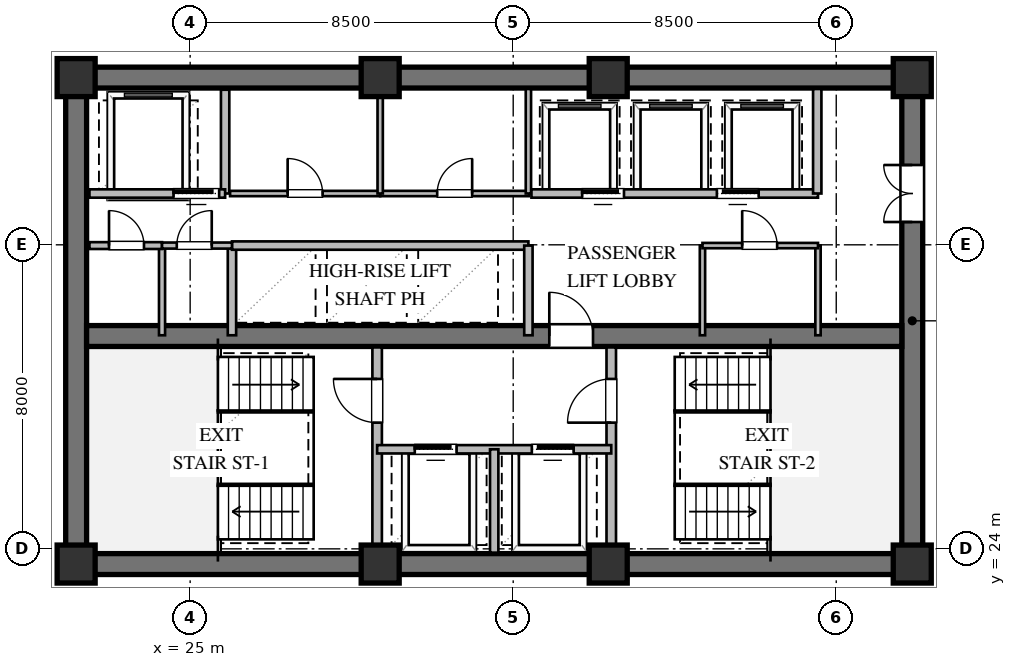
"""IFC4 building model, lengths in metres.
Left out: names, types, materials, properties, quantities, classifications, styles, units other than length and angle.
Written with IfcOpenShell. Run it as: python <this file> out.ifc"""

import sys

from ifc_helpers import new_model, si_unit, direction, frame, frame_2d, origin, origin_2d, place, context, subcontext, project, spatial, rectangle, extrude, element, fill, save


model = new_model("IFC4")
c1 = context("Model", 3, precision=1e-05, world=origin(), true_north=direction((0.0, 1.0)))
c2 = subcontext(c1, "Body", "Model", "MODEL_VIEW")
j1 = project(units=[si_unit("LENGTHUNIT", "METRE"), si_unit("PLANEANGLEUNIT", "RADIAN")], contexts=[c1])
p1 = place(None, origin())
s1 = spatial("IfcSite", under=j1, at=p1, CompositionType="ELEMENT")
p2 = place(p1, origin())
s2 = spatial("IfcBuilding", under=s1, at=p2, CompositionType="ELEMENT")
p3 = place(p2, frame((0.0, 0.0, 167.4)))
s3 = spatial("IfcBuildingStorey", under=s2, at=p3, CompositionType="ELEMENT", Elevation=167.4)
for number, where, z_axis, x_axis in (
    (1, (21.725, 23.6, 0.0), (0.0, 0.0, 1.0), (1.0, 0.0, 0.0)),
    (2, (21.725, 36.4, 0.0), (0.0, 0.0, 1.0), (1.0, 0.0, 0.0)),
):
    element("IfcWall", number, at=place(p3, frame(where, z_axis=z_axis, x_axis=x_axis)), inside=s3, PredefinedType="SHEAR", context=c2, shape_type="SweptSolid", body=[
        extrude(rectangle(XDim=22.55, YDim=0.55, at=frame_2d((11.275, 0.0))), origin(), (0.0, 0.0, 1.0), 3.36),
    ])
p4 = place(p3, frame((22.0, 23.875, 0.0), z_axis=(0.0, 0.0, 1.0), x_axis=(0.0, 1.0, 0.0)))
e3 = element("IfcWall", 3, at=p4, inside=s3, PredefinedType="SHEAR", context=c2, shape_type="SweptSolid", body=[
    extrude(rectangle(XDim=12.25, YDim=0.55, at=frame_2d((6.125, 0.0))), origin(), (0.0, 0.0, 1.0), 3.36),
])
p5 = place(p3, frame((44.0, 23.875, 0.0), z_axis=(0.0, 0.0, 1.0), x_axis=(0.0, 1.0, 0.0)))
e4 = element("IfcWall", 4, at=p5, inside=s3, PredefinedType="SHEAR", context=c2, shape_type="SweptSolid", body=[
    extrude(rectangle(XDim=12.25, YDim=0.55, at=frame_2d((6.125, 0.0))), origin(), (0.0, 0.0, 1.0), 3.36),
])
p6 = place(p5, frame((8.725, 0.0, 0.0)))
e5 = element("IfcOpeningElement", 5, at=p6, cuts=e4, PredefinedType="OPENING", context=c2, shape_type="SweptSolid", body=[
    extrude(rectangle(XDim=1.5, YDim=2.15, at=frame_2d((0.75, 1.075))), frame((0.0, 0.285, 0.0), z_axis=(0.0, -1.0, 0.0), x_axis=(1.0, 0.0, 0.0)), (0.0, 0.0, 1.0), 0.57),
])
p7 = place(p3, frame((22.275, 29.6, 0.0), z_axis=(0.0, 0.0, 1.0), x_axis=(1.0, 0.0, 0.0)))
e6 = element("IfcWall", 6, at=p7, inside=s3, PredefinedType="SHEAR", context=c2, shape_type="SweptSolid", body=[
    extrude(rectangle(XDim=21.45, YDim=0.55, at=frame_2d((10.725, 0.0))), origin(), (0.0, 0.0, 1.0), 3.36),
])
p8 = place(p7, frame((12.175, 0.0, 0.0)))
e7 = element("IfcOpeningElement", 7, at=p8, cuts=e6, PredefinedType="OPENING", context=c2, shape_type="SweptSolid", body=[
    extrude(rectangle(XDim=1.15, YDim=2.1, at=frame_2d((0.575, 1.05))), frame((0.0, 0.285, 0.0), z_axis=(0.0, -1.0, 0.0), x_axis=(1.0, 0.0, 0.0)), (0.0, 0.0, 1.0), 0.57),
])
for number, where, z_axis, x_axis in (
    (8, (22.0, 23.6, 0.0), (0.0, 0.0, 1.0), (1.0, 0.0, 0.0)),
    (9, (30.0, 23.6, 0.0), (0.0, 0.0, 1.0), (1.0, 0.0, 0.0)),
    (10, (36.0, 23.6, 0.0), (0.0, 0.0, 1.0), (1.0, 0.0, 0.0)),
    (11, (44.0, 23.6, 0.0), (0.0, 0.0, 1.0), (1.0, 0.0, 0.0)),
    (12, (44.0, 36.4, 0.0), (0.0, 0.0, 1.0), (1.0, 0.0, 0.0)),
    (13, (36.0, 36.4, 0.0), (0.0, 0.0, 1.0), (1.0, 0.0, 0.0)),
    (14, (30.0, 36.4, 0.0), (0.0, 0.0, 1.0), (1.0, 0.0, 0.0)),
    (15, (22.0, 36.4, 0.0), (0.0, 0.0, 1.0), (1.0, 0.0, 0.0)),
):
    element("IfcColumn", number, at=place(p3, frame(where, z_axis=z_axis, x_axis=x_axis)), inside=s3, PredefinedType="COLUMN", context=c2, shape_type="SweptSolid", body=[
        extrude(rectangle(XDim=1.0, YDim=1.0, at=origin_2d()), origin(), (0.0, 0.0, 1.0), 3.6),
    ])
p9 = place(p3, frame((29.92, 23.9, 0.0), z_axis=(0.0, 0.0, 1.0), x_axis=(0.0, 1.0, 0.0)))
e16 = element("IfcWall", 16, at=p9, inside=s3, PredefinedType="SOLIDWALL", context=c2, shape_type="SweptSolid", body=[
    extrude(rectangle(XDim=5.4, YDim=0.25, at=frame_2d((2.7, 0.0))), origin(), (0.0, 0.0, 1.0), 2.806),
])
p10 = place(p9, frame((3.421, 0.0, 0.0)))
e17 = element("IfcOpeningElement", 17, at=p10, cuts=e16, PredefinedType="OPENING", context=c2, shape_type="SweptSolid", body=[
    extrude(rectangle(XDim=1.15, YDim=2.1, at=frame_2d((0.575, 1.05))), frame((0.0, 0.135, 0.0), z_axis=(0.0, -1.0, 0.0), x_axis=(1.0, 0.0, 0.0)), (0.0, 0.0, 1.0), 0.27),
])
p11 = place(p3, frame((36.08, 23.9, 0.0), z_axis=(0.0, 0.0, 1.0), x_axis=(0.0, 1.0, 0.0)))
e18 = element("IfcWall", 18, at=p11, inside=s3, PredefinedType="SOLIDWALL", context=c2, shape_type="SweptSolid", body=[
    extrude(rectangle(XDim=5.4, YDim=0.25, at=frame_2d((2.7, 0.0))), origin(), (0.0, 0.0, 1.0), 3.36),
])
p12 = place(p11, frame((3.421, 0.0, 0.0)))
e19 = element("IfcOpeningElement", 19, at=p12, cuts=e18, PredefinedType="OPENING", context=c2, shape_type="SweptSolid", body=[
    extrude(rectangle(XDim=1.15, YDim=2.1, at=frame_2d((0.575, 1.05))), frame((0.0, 0.135, 0.0), z_axis=(0.0, -1.0, 0.0), x_axis=(1.0, 0.0, 0.0)), (0.0, 0.0, 1.0), 0.27),
])
p13 = place(p3, frame((29.92, 26.62, 0.0), z_axis=(0.0, 0.0, 1.0), x_axis=(1.0, 0.0, 0.0)))
e20 = element("IfcWall", 20, at=p13, inside=s3, PredefinedType="SOLIDWALL", context=c2, shape_type="SweptSolid", body=[
    extrude(rectangle(XDim=6.16, YDim=0.22, at=frame_2d((3.08, 0.0))), origin(), (0.0, 0.0, 1.0), 3.36),
])
p14 = place(p13, frame((0.99, 0.0, 0.0)))
e21 = element("IfcOpeningElement", 21, at=p14, cuts=e20, PredefinedType="OPENING", context=c2, shape_type="SweptSolid", body=[
    extrude(rectangle(XDim=1.1, YDim=2.1, at=frame_2d((0.55, 1.05))), frame((0.0, 0.12, 0.0), z_axis=(0.0, -1.0, 0.0), x_axis=(1.0, 0.0, 0.0)), (0.0, 0.0, 1.0), 0.24),
])
p15 = place(p13, frame((4.07, 0.0, 0.0)))
e22 = element("IfcOpeningElement", 22, at=p15, cuts=e20, PredefinedType="OPENING", context=c2, shape_type="SweptSolid", body=[
    extrude(rectangle(XDim=1.1, YDim=2.1, at=frame_2d((0.55, 1.05))), frame((0.0, 0.12, 0.0), z_axis=(0.0, -1.0, 0.0), x_axis=(1.0, 0.0, 0.0)), (0.0, 0.0, 1.0), 0.24),
])
p16 = place(p3, frame((33.0, 23.9, 0.0), z_axis=(0.0, 0.0, 1.0), x_axis=(0.0, 1.0, 0.0)))
e23 = element("IfcWall", 23, at=p16, inside=s3, PredefinedType="SOLIDWALL", context=c2, shape_type="SweptSolid", body=[
    extrude(rectangle(XDim=2.72, YDim=0.22, at=frame_2d((1.36, 0.0))), origin(), (0.0, 0.0, 1.0), 3.36),
])
p17 = place(p3, frame((25.92, 33.35, 0.0), z_axis=(0.0, 0.0, 1.0), x_axis=(0.0, 1.0, 0.0)))
e24 = element("IfcWall", 24, at=p17, inside=s3, PredefinedType="SOLIDWALL", context=c2, shape_type="SweptSolid", body=[
    extrude(rectangle(XDim=2.73, YDim=0.22, at=frame_2d((1.365, 0.0))), origin(), (0.0, 0.0, 1.0), 3.36),
])
p18 = place(p3, frame((22.35, 33.35, 0.0), z_axis=(0.0, 0.0, 1.0), x_axis=(1.0, 0.0, 0.0)))
e25 = element("IfcWall", 25, at=p18, inside=s3, PredefinedType="SOLIDWALL", context=c2, shape_type="SweptSolid", body=[
    extrude(rectangle(XDim=3.57, YDim=0.22, at=frame_2d((1.785, 0.0))), origin(), (0.0, 0.0, 1.0), 3.36),
])
p19 = place(p18, frame((2.213, 0.0, 0.0)))
e26 = element("IfcOpeningElement", 26, at=p19, cuts=e25, PredefinedType="OPENING", context=c2, shape_type="SweptSolid", body=[
    extrude(rectangle(XDim=1.2, YDim=2.1, at=frame_2d((0.6, 1.05))), frame((0.0, 0.12, 0.0), z_axis=(0.0, -1.0, 0.0), x_axis=(1.0, 0.0, 0.0)), (0.0, 0.0, 1.0), 0.24),
])
p20 = place(p3, frame((26.1, 29.62, 0.0), z_axis=(0.0, 0.0, 1.0), x_axis=(0.0, 1.0, 0.0)))
e27 = element("IfcWall", 27, at=p20, inside=s3, PredefinedType="SOLIDWALL", context=c2, shape_type="SweptSolid", body=[
    extrude(rectangle(XDim=2.36, YDim=0.22, at=frame_2d((1.18, 0.0))), origin(), (0.0, 0.0, 1.0), 3.36),
])
p21 = place(p3, frame((26.1, 31.98, 0.0), z_axis=(0.0, 0.0, 1.0), x_axis=(1.0, 0.0, 0.0)))
e28 = element("IfcWall", 28, at=p21, inside=s3, PredefinedType="SOLIDWALL", context=c2, shape_type="SweptSolid", body=[
    extrude(rectangle(XDim=7.8, YDim=0.22, at=frame_2d((3.9, 0.0))), origin(), (0.0, 0.0, 1.0), 3.36),
])
p22 = place(p3, frame((33.9, 29.62, 0.0), z_axis=(0.0, 0.0, 1.0), x_axis=(0.0, 1.0, 0.0)))
e29 = element("IfcWall", 29, at=p22, inside=s3, PredefinedType="SOLIDWALL", context=c2, shape_type="SweptSolid", body=[
    extrude(rectangle(XDim=2.36, YDim=0.22, at=frame_2d((1.18, 0.0))), origin(), (0.0, 0.0, 1.0), 3.36),
])
p23 = place(p3, frame((26.05, 33.35, 0.0), z_axis=(0.0, 0.0, 1.0), x_axis=(1.0, 0.0, 0.0)))
e30 = element("IfcWall", 30, at=p23, inside=s3, PredefinedType="PARTITIONING", context=c2, shape_type="SweptSolid", body=[
    extrude(rectangle(XDim=3.95, YDim=0.14, at=frame_2d((1.975, 0.0))), origin(), (0.0, 0.0, 1.0), 3.36),
])
p24 = place(p23, frame((1.515, 0.0, 0.0)))
e31 = element("IfcOpeningElement", 31, at=p24, cuts=e30, PredefinedType="OPENING", context=c2, shape_type="SweptSolid", body=[
    extrude(rectangle(XDim=0.92, YDim=2.1, at=frame_2d((0.46, 1.05))), frame((0.0, 0.08, 0.0), z_axis=(0.0, -1.0, 0.0), x_axis=(1.0, 0.0, 0.0)), (0.0, 0.0, 1.0), 0.16),
])
p25 = place(p3, frame((30.0, 33.35, 0.0), z_axis=(0.0, 0.0, 1.0), x_axis=(1.0, 0.0, 0.0)))
e32 = element("IfcWall", 32, at=p25, inside=s3, PredefinedType="PARTITIONING", context=c2, shape_type="SweptSolid", body=[
    extrude(rectangle(XDim=3.92, YDim=0.14, at=frame_2d((1.96, 0.0))), origin(), (0.0, 0.0, 1.0), 3.36),
])
p26 = place(p25, frame((1.5, 0.0, 0.0)))
e33 = element("IfcOpeningElement", 33, at=p26, cuts=e32, PredefinedType="OPENING", context=c2, shape_type="SweptSolid", body=[
    extrude(rectangle(XDim=0.92, YDim=2.1, at=frame_2d((0.46, 1.05))), frame((0.0, 0.08, 0.0), z_axis=(0.0, -1.0, 0.0), x_axis=(1.0, 0.0, 0.0)), (0.0, 0.0, 1.0), 0.16),
])
for number, where, z_axis, x_axis in (
    (34, (30.0, 33.35, 0.0), (0.0, 0.0, 1.0), (0.0, 1.0, 0.0)),
    (35, (33.9, 33.35, 0.0), (0.0, 0.0, 1.0), (0.0, 1.0, 0.0)),
):
    element("IfcWall", number, at=place(p3, frame(where, z_axis=z_axis, x_axis=x_axis)), inside=s3, PredefinedType="PARTITIONING", context=c2, shape_type="SweptSolid", body=[
        extrude(rectangle(XDim=2.75, YDim=0.14, at=frame_2d((1.375, 0.0))), origin(), (0.0, 0.0, 1.0), 3.36),
    ])
p27 = place(p3, frame((33.98, 33.35, 0.0), z_axis=(0.0, 0.0, 1.0), x_axis=(1.0, 0.0, 0.0)))
e36 = element("IfcWall", 36, at=p27, inside=s3, PredefinedType="SOLIDWALL", context=c2, shape_type="SweptSolid", body=[
    extrude(rectangle(XDim=7.54, YDim=0.22, at=frame_2d((3.77, 0.0))), origin(), (0.0, 0.0, 1.0), 3.36),
])
p28 = place(p27, frame((1.335, 0.0, 0.0)))
e37 = element("IfcOpeningElement", 37, at=p28, cuts=e36, PredefinedType="OPENING", context=c2, shape_type="SweptSolid", body=[
    extrude(rectangle(XDim=1.1, YDim=2.1, at=frame_2d((0.55, 1.05))), frame((0.0, 0.12, 0.0), z_axis=(0.0, -1.0, 0.0), x_axis=(1.0, 0.0, 0.0)), (0.0, 0.0, 1.0), 0.24),
])
p29 = place(p27, frame((4.879, 0.0, 0.0)))
e38 = element("IfcOpeningElement", 38, at=p29, cuts=e36, PredefinedType="OPENING", context=c2, shape_type="SweptSolid", body=[
    extrude(rectangle(XDim=1.1, YDim=2.1, at=frame_2d((0.55, 1.05))), frame((0.0, 0.12, 0.0), z_axis=(0.0, -1.0, 0.0), x_axis=(1.0, 0.0, 0.0)), (0.0, 0.0, 1.0), 0.24),
])
p30 = place(p3, frame((41.5, 33.35, 0.0), z_axis=(0.0, 0.0, 1.0), x_axis=(0.0, 1.0, 0.0)))
e39 = element("IfcWall", 39, at=p30, inside=s3, PredefinedType="SOLIDWALL", context=c2, shape_type="SweptSolid", body=[
    extrude(rectangle(XDim=2.75, YDim=0.22, at=frame_2d((1.375, 0.0))), origin(), (0.0, 0.0, 1.0), 3.36),
])
p31 = place(p3, frame((24.26, 29.62, 0.0), z_axis=(0.0, 0.0, 1.0), x_axis=(0.0, 1.0, 0.0)))
e40 = element("IfcWall", 40, at=p31, inside=s3, PredefinedType="PLUMBINGWALL", context=c2, shape_type="SweptSolid", body=[
    extrude(rectangle(XDim=2.36, YDim=0.16, at=frame_2d((1.18, 0.0))), origin(), (0.0, 0.0, 1.0), 3.36),
])
p32 = place(p3, frame((22.35, 31.98, 0.0), z_axis=(0.0, 0.0, 1.0), x_axis=(1.0, 0.0, 0.0)))
e41 = element("IfcWall", 41, at=p32, inside=s3, PredefinedType="PARTITIONING", context=c2, shape_type="SweptSolid", body=[
    extrude(rectangle(XDim=1.91, YDim=0.18, at=frame_2d((0.955, 0.0))), origin(), (0.0, 0.0, 1.0), 3.36),
])
p33 = place(p32, frame((0.515, 0.0, 0.0)))
e42 = element("IfcOpeningElement", 42, at=p33, cuts=e41, PredefinedType="OPENING", context=c2, shape_type="SweptSolid", body=[
    extrude(rectangle(XDim=0.92, YDim=2.1, at=frame_2d((0.46, 1.05))), frame((0.0, 0.1, 0.0), z_axis=(0.0, -1.0, 0.0), x_axis=(1.0, 0.0, 0.0)), (0.0, 0.0, 1.0), 0.2),
])
p34 = place(p3, frame((24.26, 31.98, 0.0), z_axis=(0.0, 0.0, 1.0), x_axis=(1.0, 0.0, 0.0)))
e43 = element("IfcWall", 43, at=p34, inside=s3, PredefinedType="PLUMBINGWALL", context=c2, shape_type="SweptSolid", body=[
    extrude(rectangle(XDim=1.84, YDim=0.16, at=frame_2d((0.92, 0.0))), origin(), (0.0, 0.0, 1.0), 3.36),
])
p35 = place(p34, frame((0.388, 0.0, 0.0)))
e44 = element("IfcOpeningElement", 44, at=p35, cuts=e43, PredefinedType="OPENING", context=c2, shape_type="SweptSolid", body=[
    extrude(rectangle(XDim=0.92, YDim=2.1, at=frame_2d((0.46, 1.05))), frame((0.0, 0.09, 0.0), z_axis=(0.0, -1.0, 0.0), x_axis=(1.0, 0.0, 0.0)), (0.0, 0.0, 1.0), 0.18),
])
for number, where, z_axis, x_axis in (
    (45, (38.48, 29.62, 0.0), (0.0, 0.0, 1.0), (0.0, 1.0, 0.0)),
    (46, (41.52, 29.62, 0.0), (0.0, 0.0, 1.0), (0.0, 1.0, 0.0)),
):
    element("IfcWall", number, at=place(p3, frame(where, z_axis=z_axis, x_axis=x_axis)), inside=s3, PredefinedType="PARTITIONING", context=c2, shape_type="SweptSolid", body=[
        extrude(rectangle(XDim=2.36, YDim=0.14, at=frame_2d((1.18, 0.0))), origin(), (0.0, 0.0, 1.0), 3.36),
    ])
p36 = place(p3, frame((38.48, 31.98, 0.0), z_axis=(0.0, 0.0, 1.0), x_axis=(1.0, 0.0, 0.0)))
e47 = element("IfcWall", 47, at=p36, inside=s3, PredefinedType="PARTITIONING", context=c2, shape_type="SweptSolid", body=[
    extrude(rectangle(XDim=3.04, YDim=0.14, at=frame_2d((1.52, 0.0))), origin(), (0.0, 0.0, 1.0), 3.36),
])
p37 = place(p36, frame((1.045, 0.0, 0.0)))
e48 = element("IfcOpeningElement", 48, at=p37, cuts=e47, PredefinedType="OPENING", context=c2, shape_type="SweptSolid", body=[
    extrude(rectangle(XDim=0.92, YDim=2.1, at=frame_2d((0.46, 1.05))), frame((0.0, 0.08, 0.0), z_axis=(0.0, -1.0, 0.0), x_axis=(1.0, 0.0, 0.0)), (0.0, 0.0, 1.0), 0.16),
])
p38 = place(p10, origin())
e49 = element("IfcDoor", 49, at=p38, inside=s3, OperationType="SINGLE_SWING_RIGHT", PredefinedType="DOOR", context=c2, shape_type="SweptSolid", body=[
    extrude(rectangle(XDim=1.15, YDim=2.1, at=frame_2d((0.575, 1.05))), frame((0.0, 0.025, 0.0), z_axis=(0.0, -1.0, 0.0), x_axis=(1.0, 0.0, 0.0)), (0.0, 0.0, 1.0), 0.05),
])
fill(e17, e49)
p39 = place(p12, origin())
e50 = element("IfcDoor", 50, at=p39, inside=s3, OperationType="SINGLE_SWING_LEFT", PredefinedType="DOOR", context=c2, shape_type="SweptSolid", body=[
    extrude(rectangle(XDim=1.15, YDim=2.1, at=frame_2d((0.575, 1.05))), frame((0.0, 0.025, 0.0), z_axis=(0.0, -1.0, 0.0), x_axis=(1.0, 0.0, 0.0)), (0.0, 0.0, 1.0), 0.05),
])
fill(e19, e50)
p40 = place(p14, origin())
e51 = element("IfcDoor", 51, at=p40, inside=s3, OperationType="SLIDING_TO_LEFT", PredefinedType="DOOR", context=c2, shape_type="SweptSolid", body=[
    extrude(rectangle(XDim=1.1, YDim=2.1, at=frame_2d((0.55, 1.05))), frame((0.0, 0.025, 0.0), z_axis=(0.0, -1.0, 0.0), x_axis=(1.0, 0.0, 0.0)), (0.0, 0.0, 1.0), 0.05),
])
fill(e21, e51)
p41 = place(p15, origin())
e52 = element("IfcDoor", 52, at=p41, inside=s3, OperationType="SLIDING_TO_RIGHT", PredefinedType="DOOR", context=c2, shape_type="SweptSolid", body=[
    extrude(rectangle(XDim=1.1, YDim=2.1, at=frame_2d((0.55, 1.05))), frame((0.0, 0.025, 0.0), z_axis=(0.0, -1.0, 0.0), x_axis=(1.0, 0.0, 0.0)), (0.0, 0.0, 1.0), 0.05),
])
fill(e22, e52)
p42 = place(p8, origin())
e53 = element("IfcDoor", 53, at=p42, inside=s3, OperationType="SINGLE_SWING_LEFT", PredefinedType="DOOR", context=c2, shape_type="SweptSolid", body=[
    extrude(rectangle(XDim=1.15, YDim=2.1, at=frame_2d((0.575, 1.05))), frame((0.0, 0.025, 0.0), z_axis=(0.0, -1.0, 0.0), x_axis=(1.0, 0.0, 0.0)), (0.0, 0.0, 1.0), 0.05),
])
fill(e7, e53)
p43 = place(p6, origin())
e54 = element("IfcDoor", 54, at=p43, inside=s3, OperationType="DOUBLE_DOOR_SINGLE_SWING", PredefinedType="DOOR", context=c2, shape_type="SweptSolid", body=[
    extrude(rectangle(XDim=1.5, YDim=2.15, at=frame_2d((0.75, 1.075))), frame((0.0, 0.025, 0.0), z_axis=(0.0, -1.0, 0.0), x_axis=(1.0, 0.0, 0.0)), (0.0, 0.0, 1.0), 0.05),
])
fill(e5, e54)
p44 = place(p19, origin())
e55 = element("IfcDoor", 55, at=p44, inside=s3, OperationType="SLIDING_TO_LEFT", PredefinedType="DOOR", context=c2, shape_type="SweptSolid", body=[
    extrude(rectangle(XDim=1.2, YDim=2.1, at=frame_2d((0.6, 1.05))), frame((0.0, 0.025, 0.0), z_axis=(0.0, -1.0, 0.0), x_axis=(1.0, 0.0, 0.0)), (0.0, 0.0, 1.0), 0.05),
])
fill(e26, e55)
p45 = place(p24, origin())
e56 = element("IfcDoor", 56, at=p45, inside=s3, OperationType="SINGLE_SWING_LEFT", PredefinedType="DOOR", context=c2, shape_type="SweptSolid", body=[
    extrude(rectangle(XDim=0.92, YDim=2.1, at=frame_2d((0.46, 1.05))), frame((0.0, 0.025, 0.0), z_axis=(0.0, -1.0, 0.0), x_axis=(1.0, 0.0, 0.0)), (0.0, 0.0, 1.0), 0.05),
])
fill(e31, e56)
p46 = place(p26, origin())
e57 = element("IfcDoor", 57, at=p46, inside=s3, OperationType="SINGLE_SWING_RIGHT", PredefinedType="DOOR", context=c2, shape_type="SweptSolid", body=[
    extrude(rectangle(XDim=0.92, YDim=2.1, at=frame_2d((0.46, 1.05))), frame((0.0, 0.025, 0.0), z_axis=(0.0, -1.0, 0.0), x_axis=(1.0, 0.0, 0.0)), (0.0, 0.0, 1.0), 0.05),
])
fill(e33, e57)
p47 = place(p28, origin())
e58 = element("IfcDoor", 58, at=p47, inside=s3, OperationType="SLIDING_TO_LEFT", PredefinedType="DOOR", context=c2, shape_type="SweptSolid", body=[
    extrude(rectangle(XDim=1.1, YDim=2.1, at=frame_2d((0.55, 1.05))), frame((0.0, 0.025, 0.0), z_axis=(0.0, -1.0, 0.0), x_axis=(1.0, 0.0, 0.0)), (0.0, 0.0, 1.0), 0.05),
])
fill(e37, e58)
p48 = place(p29, origin())
e59 = element("IfcDoor", 59, at=p48, inside=s3, OperationType="SLIDING_TO_RIGHT", PredefinedType="DOOR", context=c2, shape_type="SweptSolid", body=[
    extrude(rectangle(XDim=1.1, YDim=2.1, at=frame_2d((0.55, 1.05))), frame((0.0, 0.025, 0.0), z_axis=(0.0, -1.0, 0.0), x_axis=(1.0, 0.0, 0.0)), (0.0, 0.0, 1.0), 0.05),
])
fill(e38, e59)
p49 = place(p33, origin())
e60 = element("IfcDoor", 60, at=p49, inside=s3, OperationType="SINGLE_SWING_LEFT", PredefinedType="DOOR", context=c2, shape_type="SweptSolid", body=[
    extrude(rectangle(XDim=0.92, YDim=2.1, at=frame_2d((0.46, 1.05))), frame((0.0, 0.025, 0.0), z_axis=(0.0, -1.0, 0.0), x_axis=(1.0, 0.0, 0.0)), (0.0, 0.0, 1.0), 0.05),
])
fill(e42, e60)
p50 = place(p35, origin())
e61 = element("IfcDoor", 61, at=p50, inside=s3, OperationType="SINGLE_SWING_RIGHT", PredefinedType="DOOR", context=c2, shape_type="SweptSolid", body=[
    extrude(rectangle(XDim=0.92, YDim=2.1, at=frame_2d((0.46, 1.05))), frame((0.0, 0.025, 0.0), z_axis=(0.0, -1.0, 0.0), x_axis=(1.0, 0.0, 0.0)), (0.0, 0.0, 1.0), 0.05),
])
fill(e44, e61)
p51 = place(p37, origin())
e62 = element("IfcDoor", 62, at=p51, inside=s3, OperationType="SINGLE_SWING_LEFT", PredefinedType="DOOR", context=c2, shape_type="SweptSolid", body=[
    extrude(rectangle(XDim=0.92, YDim=2.1, at=frame_2d((0.46, 1.05))), frame((0.0, 0.025, 0.0), z_axis=(0.0, -1.0, 0.0), x_axis=(1.0, 0.0, 0.0)), (0.0, 0.0, 1.0), 0.05),
])
fill(e48, e62)
save(model, sys.argv[1])
